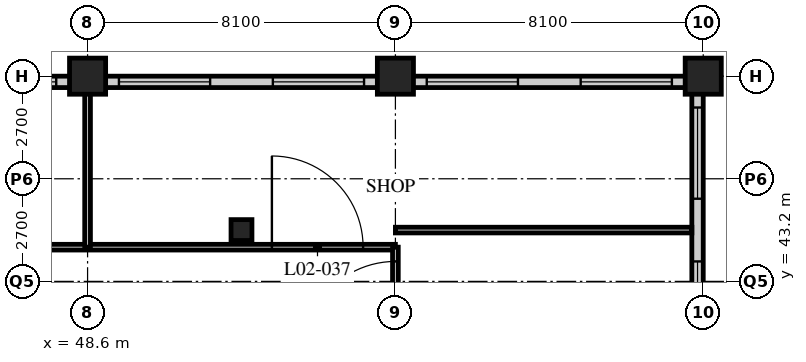
"""IFC4 building model, lengths in metres.
Left out: names, types, materials, properties, quantities, classifications, styles, units other than length and angle.
Written with IfcOpenShell. Run it as: python <this file> out.ifc"""

import sys

from ifc_helpers import new_model, si_unit, direction, frame, frame_2d, origin, origin_2d, place, context, subcontext, project, spatial, rectangle, hollow_rectangle, extrude, element, fill, save


model = new_model("IFC4")
c1 = context("Model", 3, precision=1e-05, world=origin(), true_north=direction((0.0, 1.0)))
c2 = subcontext(c1, "Body", "Model", "MODEL_VIEW")
j1 = project(units=[si_unit("LENGTHUNIT", "METRE"), si_unit("PLANEANGLEUNIT", "RADIAN")], contexts=[c1])
p1 = place(None, origin())
s1 = spatial("IfcSite", under=j1, at=p1, CompositionType="ELEMENT")
p2 = place(p1, origin())
s2 = spatial("IfcBuilding", under=s1, at=p2, CompositionType="ELEMENT")
p3 = place(p2, frame((0.0, 0.0, 11.4)))
s3 = spatial("IfcBuildingStorey", under=s2, at=p3, CompositionType="ELEMENT", Elevation=11.4)
p4 = place(p3, frame((48.6, 48.6, 0.0), z_axis=(0.0, 0.0, 1.0), x_axis=(1.0, 0.0, 0.0)))
e1 = element("IfcColumn", 1, at=p4, inside=s3, PredefinedType="COLUMN", context=c2, shape_type="SweptSolid", body=[
    extrude(hollow_rectangle(XDim=0.95, YDim=0.95, WallThickness=0.1, at=origin_2d()), origin(), (0.0, 0.0, 1.0), 5.4),
])
p5 = place(p3, frame((52.65, 44.55, 0.0), z_axis=(0.0, 0.0, 1.0), x_axis=(1.0, 0.0, 0.0)))
e2 = element("IfcColumn", 2, at=p5, inside=s3, PredefinedType="COLUMN", context=c2, shape_type="SweptSolid", body=[
    extrude(hollow_rectangle(XDim=0.55, YDim=0.55, WallThickness=0.05, at=origin_2d()), origin(), (0.0, 0.0, 1.0), 5.4),
])
for number, where, z_axis, x_axis in (
    (3, (56.7, 48.6, 0.0), (0.0, 0.0, 1.0), (1.0, 0.0, 0.0)),
    (4, (64.8, 48.6, 0.0), (0.0, 0.0, 1.0), (1.0, 0.0, 0.0)),
):
    element("IfcColumn", number, at=place(p3, frame(where, z_axis=z_axis, x_axis=x_axis)), inside=s3, PredefinedType="COLUMN", context=c2, shape_type="SweptSolid", body=[
        extrude(hollow_rectangle(XDim=0.95, YDim=0.95, WallThickness=0.1, at=origin_2d()), origin(), (0.0, 0.0, 1.0), 5.4),
    ])
p6 = place(p3, frame((64.65, 0.24, 0.0), z_axis=(0.0, 0.0, 1.0), x_axis=(0.0, 1.0, 0.0)))
e5 = element("IfcWall", 5, at=p6, inside=s3, PredefinedType="SOLIDWALL", context=c2, shape_type="SweptSolid", body=[
    extrude(rectangle(XDim=48.36, YDim=0.3, at=frame_2d((24.18, 0.0))), origin(), (0.0, 0.0, 1.0), 5.15),
])
p7 = place(p6, frame((0.585, 0.0, 1.0)))
e6 = element("IfcOpeningElement", 6, at=p7, cuts=e5, PredefinedType="OPENING", context=c2, shape_type="SweptSolid", body=[
    extrude(rectangle(XDim=2.4, YDim=2.75, at=frame_2d((1.2, 1.375))), frame((0.0, 0.16, 0.0), z_axis=(0.0, -1.0, 0.0), x_axis=(1.0, 0.0, 0.0)), (0.0, 0.0, 1.0), 0.32),
])
p8 = place(p6, frame((4.635, 0.0, 1.0)))
e7 = element("IfcOpeningElement", 7, at=p8, cuts=e5, PredefinedType="OPENING", context=c2, shape_type="SweptSolid", body=[
    extrude(rectangle(XDim=2.4, YDim=2.75, at=frame_2d((1.2, 1.375))), frame((0.0, 0.16, 0.0), z_axis=(0.0, -1.0, 0.0), x_axis=(1.0, 0.0, 0.0)), (0.0, 0.0, 1.0), 0.32),
])
p9 = place(p6, frame((8.685, 0.0, 1.0)))
e8 = element("IfcOpeningElement", 8, at=p9, cuts=e5, PredefinedType="OPENING", context=c2, shape_type="SweptSolid", body=[
    extrude(rectangle(XDim=2.4, YDim=2.75, at=frame_2d((1.2, 1.375))), frame((0.0, 0.16, 0.0), z_axis=(0.0, -1.0, 0.0), x_axis=(1.0, 0.0, 0.0)), (0.0, 0.0, 1.0), 0.32),
])
p10 = place(p6, frame((12.735, 0.0, 1.0)))
e9 = element("IfcOpeningElement", 9, at=p10, cuts=e5, PredefinedType="OPENING", context=c2, shape_type="SweptSolid", body=[
    extrude(rectangle(XDim=2.4, YDim=2.75, at=frame_2d((1.2, 1.375))), frame((0.0, 0.16, 0.0), z_axis=(0.0, -1.0, 0.0), x_axis=(1.0, 0.0, 0.0)), (0.0, 0.0, 1.0), 0.32),
])
p11 = place(p6, frame((16.785, 0.0, 1.0)))
e10 = element("IfcOpeningElement", 10, at=p11, cuts=e5, PredefinedType="OPENING", context=c2, shape_type="SweptSolid", body=[
    extrude(rectangle(XDim=2.4, YDim=2.75, at=frame_2d((1.2, 1.375))), frame((0.0, 0.16, 0.0), z_axis=(0.0, -1.0, 0.0), x_axis=(1.0, 0.0, 0.0)), (0.0, 0.0, 1.0), 0.32),
])
p12 = place(p6, frame((20.835, 0.0, 1.0)))
e11 = element("IfcOpeningElement", 11, at=p12, cuts=e5, PredefinedType="OPENING", context=c2, shape_type="SweptSolid", body=[
    extrude(rectangle(XDim=2.4, YDim=2.75, at=frame_2d((1.2, 1.375))), frame((0.0, 0.16, 0.0), z_axis=(0.0, -1.0, 0.0), x_axis=(1.0, 0.0, 0.0)), (0.0, 0.0, 1.0), 0.32),
])
p13 = place(p6, frame((24.885, 0.0, 1.0)))
e12 = element("IfcOpeningElement", 12, at=p13, cuts=e5, PredefinedType="OPENING", context=c2, shape_type="SweptSolid", body=[
    extrude(rectangle(XDim=2.4, YDim=2.75, at=frame_2d((1.2, 1.375))), frame((0.0, 0.16, 0.0), z_axis=(0.0, -1.0, 0.0), x_axis=(1.0, 0.0, 0.0)), (0.0, 0.0, 1.0), 0.32),
])
p14 = place(p6, frame((28.935, 0.0, 1.0)))
e13 = element("IfcOpeningElement", 13, at=p14, cuts=e5, PredefinedType="OPENING", context=c2, shape_type="SweptSolid", body=[
    extrude(rectangle(XDim=2.4, YDim=2.75, at=frame_2d((1.2, 1.375))), frame((0.0, 0.16, 0.0), z_axis=(0.0, -1.0, 0.0), x_axis=(1.0, 0.0, 0.0)), (0.0, 0.0, 1.0), 0.32),
])
p15 = place(p6, frame((32.985, 0.0, 1.0)))
e14 = element("IfcOpeningElement", 14, at=p15, cuts=e5, PredefinedType="OPENING", context=c2, shape_type="SweptSolid", body=[
    extrude(rectangle(XDim=2.4, YDim=2.75, at=frame_2d((1.2, 1.375))), frame((0.0, 0.16, 0.0), z_axis=(0.0, -1.0, 0.0), x_axis=(1.0, 0.0, 0.0)), (0.0, 0.0, 1.0), 0.32),
])
p16 = place(p6, frame((37.035, 0.0, 1.0)))
e15 = element("IfcOpeningElement", 15, at=p16, cuts=e5, PredefinedType="OPENING", context=c2, shape_type="SweptSolid", body=[
    extrude(rectangle(XDim=2.4, YDim=2.75, at=frame_2d((1.2, 1.375))), frame((0.0, 0.16, 0.0), z_axis=(0.0, -1.0, 0.0), x_axis=(1.0, 0.0, 0.0)), (0.0, 0.0, 1.0), 0.32),
])
p17 = place(p6, frame((41.085, 0.0, 1.0)))
e16 = element("IfcOpeningElement", 16, at=p17, cuts=e5, PredefinedType="OPENING", context=c2, shape_type="SweptSolid", body=[
    extrude(rectangle(XDim=2.4, YDim=2.75, at=frame_2d((1.2, 1.375))), frame((0.0, 0.16, 0.0), z_axis=(0.0, -1.0, 0.0), x_axis=(1.0, 0.0, 0.0)), (0.0, 0.0, 1.0), 0.32),
])
p18 = place(p6, frame((45.135, 0.0, 1.0)))
e17 = element("IfcOpeningElement", 17, at=p18, cuts=e5, PredefinedType="OPENING", context=c2, shape_type="SweptSolid", body=[
    extrude(rectangle(XDim=2.4, YDim=2.75, at=frame_2d((1.2, 1.375))), frame((0.0, 0.16, 0.0), z_axis=(0.0, -1.0, 0.0), x_axis=(1.0, 0.0, 0.0)), (0.0, 0.0, 1.0), 0.32),
])
p19 = place(p3, frame((64.5, 48.45, 0.0), z_axis=(0.0, 0.0, 1.0), x_axis=(-1.0, 0.0, 0.0)))
e18 = element("IfcWall", 18, at=p19, inside=s3, PredefinedType="SOLIDWALL", context=c2, shape_type="SweptSolid", body=[
    extrude(rectangle(XDim=72.6, YDim=0.3, at=frame_2d((36.3, 0.0))), origin(), (0.0, 0.0, 1.0), 5.15),
])
p20 = place(p19, frame((0.525, 0.0, 1.0)))
e19 = element("IfcOpeningElement", 19, at=p20, cuts=e18, PredefinedType="OPENING", context=c2, shape_type="SweptSolid", body=[
    extrude(rectangle(XDim=2.4, YDim=2.75, at=frame_2d((1.2, 1.375))), frame((0.0, 0.16, 0.0), z_axis=(0.0, -1.0, 0.0), x_axis=(1.0, 0.0, 0.0)), (0.0, 0.0, 1.0), 0.32),
])
p21 = place(p19, frame((4.575, 0.0, 1.0)))
e20 = element("IfcOpeningElement", 20, at=p21, cuts=e18, PredefinedType="OPENING", context=c2, shape_type="SweptSolid", body=[
    extrude(rectangle(XDim=2.4, YDim=2.75, at=frame_2d((1.2, 1.375))), frame((0.0, 0.16, 0.0), z_axis=(0.0, -1.0, 0.0), x_axis=(1.0, 0.0, 0.0)), (0.0, 0.0, 1.0), 0.32),
])
p22 = place(p19, frame((8.625, 0.0, 1.0)))
e21 = element("IfcOpeningElement", 21, at=p22, cuts=e18, PredefinedType="OPENING", context=c2, shape_type="SweptSolid", body=[
    extrude(rectangle(XDim=2.4, YDim=2.75, at=frame_2d((1.2, 1.375))), frame((0.0, 0.16, 0.0), z_axis=(0.0, -1.0, 0.0), x_axis=(1.0, 0.0, 0.0)), (0.0, 0.0, 1.0), 0.32),
])
p23 = place(p19, frame((12.675, 0.0, 1.0)))
e22 = element("IfcOpeningElement", 22, at=p23, cuts=e18, PredefinedType="OPENING", context=c2, shape_type="SweptSolid", body=[
    extrude(rectangle(XDim=2.4, YDim=2.75, at=frame_2d((1.2, 1.375))), frame((0.0, 0.16, 0.0), z_axis=(0.0, -1.0, 0.0), x_axis=(1.0, 0.0, 0.0)), (0.0, 0.0, 1.0), 0.32),
])
p24 = place(p19, frame((16.725, 0.0, 1.0)))
e23 = element("IfcOpeningElement", 23, at=p24, cuts=e18, PredefinedType="OPENING", context=c2, shape_type="SweptSolid", body=[
    extrude(rectangle(XDim=2.4, YDim=2.75, at=frame_2d((1.2, 1.375))), frame((0.0, 0.16, 0.0), z_axis=(0.0, -1.0, 0.0), x_axis=(1.0, 0.0, 0.0)), (0.0, 0.0, 1.0), 0.32),
])
p25 = place(p19, frame((20.775, 0.0, 1.0)))
e24 = element("IfcOpeningElement", 24, at=p25, cuts=e18, PredefinedType="OPENING", context=c2, shape_type="SweptSolid", body=[
    extrude(rectangle(XDim=2.4, YDim=2.75, at=frame_2d((1.2, 1.375))), frame((0.0, 0.16, 0.0), z_axis=(0.0, -1.0, 0.0), x_axis=(1.0, 0.0, 0.0)), (0.0, 0.0, 1.0), 0.32),
])
p26 = place(p19, frame((24.825, 0.0, 1.0)))
e25 = element("IfcOpeningElement", 25, at=p26, cuts=e18, PredefinedType="OPENING", context=c2, shape_type="SweptSolid", body=[
    extrude(rectangle(XDim=2.4, YDim=2.75, at=frame_2d((1.2, 1.375))), frame((0.0, 0.16, 0.0), z_axis=(0.0, -1.0, 0.0), x_axis=(1.0, 0.0, 0.0)), (0.0, 0.0, 1.0), 0.32),
])
p27 = place(p19, frame((28.875, 0.0, 1.0)))
e26 = element("IfcOpeningElement", 26, at=p27, cuts=e18, PredefinedType="OPENING", context=c2, shape_type="SweptSolid", body=[
    extrude(rectangle(XDim=2.4, YDim=2.75, at=frame_2d((1.2, 1.375))), frame((0.0, 0.16, 0.0), z_axis=(0.0, -1.0, 0.0), x_axis=(1.0, 0.0, 0.0)), (0.0, 0.0, 1.0), 0.32),
])
p28 = place(p19, frame((32.925, 0.0, 1.0)))
e27 = element("IfcOpeningElement", 27, at=p28, cuts=e18, PredefinedType="OPENING", context=c2, shape_type="SweptSolid", body=[
    extrude(rectangle(XDim=2.4, YDim=2.75, at=frame_2d((1.2, 1.375))), frame((0.0, 0.16, 0.0), z_axis=(0.0, -1.0, 0.0), x_axis=(1.0, 0.0, 0.0)), (0.0, 0.0, 1.0), 0.32),
])
p29 = place(p19, frame((36.975, 0.0, 1.0)))
e28 = element("IfcOpeningElement", 28, at=p29, cuts=e18, PredefinedType="OPENING", context=c2, shape_type="SweptSolid", body=[
    extrude(rectangle(XDim=2.4, YDim=2.75, at=frame_2d((1.2, 1.375))), frame((0.0, 0.16, 0.0), z_axis=(0.0, -1.0, 0.0), x_axis=(1.0, 0.0, 0.0)), (0.0, 0.0, 1.0), 0.32),
])
p30 = place(p19, frame((41.025, 0.0, 1.0)))
e29 = element("IfcOpeningElement", 29, at=p30, cuts=e18, PredefinedType="OPENING", context=c2, shape_type="SweptSolid", body=[
    extrude(rectangle(XDim=2.4, YDim=2.75, at=frame_2d((1.2, 1.375))), frame((0.0, 0.16, 0.0), z_axis=(0.0, -1.0, 0.0), x_axis=(1.0, 0.0, 0.0)), (0.0, 0.0, 1.0), 0.32),
])
p31 = place(p19, frame((45.075, 0.0, 1.0)))
e30 = element("IfcOpeningElement", 30, at=p31, cuts=e18, PredefinedType="OPENING", context=c2, shape_type="SweptSolid", body=[
    extrude(rectangle(XDim=2.4, YDim=2.75, at=frame_2d((1.2, 1.375))), frame((0.0, 0.16, 0.0), z_axis=(0.0, -1.0, 0.0), x_axis=(1.0, 0.0, 0.0)), (0.0, 0.0, 1.0), 0.32),
])
p32 = place(p19, frame((49.125, 0.0, 1.0)))
e31 = element("IfcOpeningElement", 31, at=p32, cuts=e18, PredefinedType="OPENING", context=c2, shape_type="SweptSolid", body=[
    extrude(rectangle(XDim=2.4, YDim=2.75, at=frame_2d((1.2, 1.375))), frame((0.0, 0.16, 0.0), z_axis=(0.0, -1.0, 0.0), x_axis=(1.0, 0.0, 0.0)), (0.0, 0.0, 1.0), 0.32),
])
p33 = place(p19, frame((53.175, 0.0, 1.0)))
e32 = element("IfcOpeningElement", 32, at=p33, cuts=e18, PredefinedType="OPENING", context=c2, shape_type="SweptSolid", body=[
    extrude(rectangle(XDim=2.4, YDim=2.75, at=frame_2d((1.2, 1.375))), frame((0.0, 0.16, 0.0), z_axis=(0.0, -1.0, 0.0), x_axis=(1.0, 0.0, 0.0)), (0.0, 0.0, 1.0), 0.32),
])
p34 = place(p19, frame((57.225, 0.0, 1.0)))
e33 = element("IfcOpeningElement", 33, at=p34, cuts=e18, PredefinedType="OPENING", context=c2, shape_type="SweptSolid", body=[
    extrude(rectangle(XDim=2.4, YDim=2.75, at=frame_2d((1.2, 1.375))), frame((0.0, 0.16, 0.0), z_axis=(0.0, -1.0, 0.0), x_axis=(1.0, 0.0, 0.0)), (0.0, 0.0, 1.0), 0.32),
])
p35 = place(p19, frame((61.275, 0.0, 1.0)))
e34 = element("IfcOpeningElement", 34, at=p35, cuts=e18, PredefinedType="OPENING", context=c2, shape_type="SweptSolid", body=[
    extrude(rectangle(XDim=2.4, YDim=2.75, at=frame_2d((1.2, 1.375))), frame((0.0, 0.16, 0.0), z_axis=(0.0, -1.0, 0.0), x_axis=(1.0, 0.0, 0.0)), (0.0, 0.0, 1.0), 0.32),
])
p36 = place(p19, frame((65.325, 0.0, 1.0)))
e35 = element("IfcOpeningElement", 35, at=p36, cuts=e18, PredefinedType="OPENING", context=c2, shape_type="SweptSolid", body=[
    extrude(rectangle(XDim=2.4, YDim=2.75, at=frame_2d((1.2, 1.375))), frame((0.0, 0.16, 0.0), z_axis=(0.0, -1.0, 0.0), x_axis=(1.0, 0.0, 0.0)), (0.0, 0.0, 1.0), 0.32),
])
p37 = place(p19, frame((69.375, 0.0, 1.0)))
e36 = element("IfcOpeningElement", 36, at=p37, cuts=e18, PredefinedType="OPENING", context=c2, shape_type="SweptSolid", body=[
    extrude(rectangle(XDim=2.4, YDim=2.75, at=frame_2d((1.2, 1.375))), frame((0.0, 0.16, 0.0), z_axis=(0.0, -1.0, 0.0), x_axis=(1.0, 0.0, 0.0)), (0.0, 0.0, 1.0), 0.32),
])
p38 = place(p3, frame((0.0, 44.1, 0.0), z_axis=(0.0, 0.0, 1.0), x_axis=(1.0, 0.0, 0.0)))
e37 = element("IfcWall", 37, at=p38, inside=s3, PredefinedType="PARTITIONING", context=c2, shape_type="SweptSolid", body=[
    extrude(rectangle(XDim=56.7, YDim=0.15, at=frame_2d((28.35, 0.0))), origin(), (0.0, 0.0, 1.0), 5.15),
])
p39 = place(p38, frame((10.95, 0.0, 0.0)))
e38 = element("IfcOpeningElement", 38, at=p39, cuts=e37, PredefinedType="OPENING", context=c2, shape_type="SweptSolid", body=[
    extrude(rectangle(XDim=2.4, YDim=2.7, at=frame_2d((1.2, 1.35))), frame((0.0, 0.085, 0.0), z_axis=(0.0, -1.0, 0.0), x_axis=(1.0, 0.0, 0.0)), (0.0, 0.0, 1.0), 0.17),
])
p40 = place(p38, frame((19.05, 0.0, 0.0)))
e39 = element("IfcOpeningElement", 39, at=p40, cuts=e37, PredefinedType="OPENING", context=c2, shape_type="SweptSolid", body=[
    extrude(rectangle(XDim=2.4, YDim=2.7, at=frame_2d((1.2, 1.35))), frame((0.0, 0.085, 0.0), z_axis=(0.0, -1.0, 0.0), x_axis=(1.0, 0.0, 0.0)), (0.0, 0.0, 1.0), 0.17),
])
p41 = place(p38, frame((27.15, 0.0, 0.0)))
e40 = element("IfcOpeningElement", 40, at=p41, cuts=e37, PredefinedType="OPENING", context=c2, shape_type="SweptSolid", body=[
    extrude(rectangle(XDim=2.4, YDim=2.7, at=frame_2d((1.2, 1.35))), frame((0.0, 0.085, 0.0), z_axis=(0.0, -1.0, 0.0), x_axis=(1.0, 0.0, 0.0)), (0.0, 0.0, 1.0), 0.17),
])
p42 = place(p38, frame((35.25, 0.0, 0.0)))
e41 = element("IfcOpeningElement", 41, at=p42, cuts=e37, PredefinedType="OPENING", context=c2, shape_type="SweptSolid", body=[
    extrude(rectangle(XDim=2.4, YDim=2.7, at=frame_2d((1.2, 1.35))), frame((0.0, 0.085, 0.0), z_axis=(0.0, -1.0, 0.0), x_axis=(1.0, 0.0, 0.0)), (0.0, 0.0, 1.0), 0.17),
])
p43 = place(p38, frame((43.35, 0.0, 0.0)))
e42 = element("IfcOpeningElement", 42, at=p43, cuts=e37, PredefinedType="OPENING", context=c2, shape_type="SweptSolid", body=[
    extrude(rectangle(XDim=2.4, YDim=2.7, at=frame_2d((1.2, 1.35))), frame((0.0, 0.085, 0.0), z_axis=(0.0, -1.0, 0.0), x_axis=(1.0, 0.0, 0.0)), (0.0, 0.0, 1.0), 0.17),
])
p44 = place(p38, frame((53.45, 0.0, 0.0)))
e43 = element("IfcOpeningElement", 43, at=p44, cuts=e37, PredefinedType="OPENING", context=c2, shape_type="SweptSolid", body=[
    extrude(rectangle(XDim=2.4, YDim=2.7, at=frame_2d((1.2, 1.35))), frame((0.0, 0.085, 0.0), z_axis=(0.0, -1.0, 0.0), x_axis=(1.0, 0.0, 0.0)), (0.0, 0.0, 1.0), 0.17),
])
p45 = place(p38, frame((4.85, 0.0, 0.0)))
e44 = element("IfcOpeningElement", 44, at=p45, cuts=e37, PredefinedType="OPENING", context=c2, shape_type="SweptSolid", body=[
    extrude(rectangle(XDim=2.4, YDim=2.7, at=frame_2d((1.2, 1.35))), frame((0.0, 0.085, 0.0), z_axis=(0.0, -1.0, 0.0), x_axis=(1.0, 0.0, 0.0)), (0.0, 0.0, 1.0), 0.17),
])
p46 = place(p3, frame((56.7, 8.1, 0.0), z_axis=(0.0, 0.0, 1.0), x_axis=(0.0, 1.0, 0.0)))
e45 = element("IfcWall", 45, at=p46, inside=s3, PredefinedType="PARTITIONING", context=c2, shape_type="SweptSolid", body=[
    extrude(rectangle(XDim=36.0, YDim=0.15, at=frame_2d((18.0, 0.0))), origin(), (0.0, 0.0, 1.0), 4.538),
])
p47 = place(p46, frame((2.85, 0.0, 0.0)))
e46 = element("IfcOpeningElement", 46, at=p47, cuts=e45, PredefinedType="OPENING", context=c2, shape_type="SweptSolid", body=[
    extrude(rectangle(XDim=2.4, YDim=2.7, at=frame_2d((1.2, 1.35))), frame((0.0, 0.085, 0.0), z_axis=(0.0, -1.0, 0.0), x_axis=(1.0, 0.0, 0.0)), (0.0, 0.0, 1.0), 0.17),
])
p48 = place(p46, frame((10.95, 0.0, 0.0)))
e47 = element("IfcOpeningElement", 47, at=p48, cuts=e45, PredefinedType="OPENING", context=c2, shape_type="SweptSolid", body=[
    extrude(rectangle(XDim=2.4, YDim=2.7, at=frame_2d((1.2, 1.35))), frame((0.0, 0.085, 0.0), z_axis=(0.0, -1.0, 0.0), x_axis=(1.0, 0.0, 0.0)), (0.0, 0.0, 1.0), 0.17),
])
p49 = place(p46, frame((19.05, 0.0, 0.0)))
e48 = element("IfcOpeningElement", 48, at=p49, cuts=e45, PredefinedType="OPENING", context=c2, shape_type="SweptSolid", body=[
    extrude(rectangle(XDim=2.4, YDim=2.7, at=frame_2d((1.2, 1.35))), frame((0.0, 0.085, 0.0), z_axis=(0.0, -1.0, 0.0), x_axis=(1.0, 0.0, 0.0)), (0.0, 0.0, 1.0), 0.17),
])
p50 = place(p46, frame((27.15, 0.0, 0.0)))
e49 = element("IfcOpeningElement", 49, at=p50, cuts=e45, PredefinedType="OPENING", context=c2, shape_type="SweptSolid", body=[
    extrude(rectangle(XDim=2.4, YDim=2.7, at=frame_2d((1.2, 1.35))), frame((0.0, 0.085, 0.0), z_axis=(0.0, -1.0, 0.0), x_axis=(1.0, 0.0, 0.0)), (0.0, 0.0, 1.0), 0.17),
])
p51 = place(p46, frame((33.225, 0.0, 0.0)))
e50 = element("IfcOpeningElement", 50, at=p51, cuts=e45, PredefinedType="OPENING", context=c2, shape_type="SweptSolid", body=[
    extrude(rectangle(XDim=2.4, YDim=2.7, at=frame_2d((1.2, 1.35))), frame((0.0, 0.085, 0.0), z_axis=(0.0, -1.0, 0.0), x_axis=(1.0, 0.0, 0.0)), (0.0, 0.0, 1.0), 0.17),
])
p52 = place(p3, frame((56.7, 44.55, 0.0), z_axis=(0.0, 0.0, 1.0), x_axis=(1.0, 0.0, 0.0)))
e51 = element("IfcWall", 51, at=p52, inside=s3, PredefinedType="PARTITIONING", context=c2, shape_type="SweptSolid", body=[
    extrude(rectangle(XDim=7.8, YDim=0.15, at=frame_2d((3.9, 0.0))), origin(), (0.0, 0.0, 1.0), 5.15),
])
p53 = place(p3, frame((48.6, 44.1, 0.0), z_axis=(0.0, 0.0, 1.0), x_axis=(0.0, 1.0, 0.0)))
e52 = element("IfcWall", 52, at=p53, inside=s3, PredefinedType="PARTITIONING", context=c2, shape_type="SweptSolid", body=[
    extrude(rectangle(XDim=4.2, YDim=0.15, at=frame_2d((2.1, 0.0))), origin(), (0.0, 0.0, 1.0), 4.538),
])
p54 = place(p17, origin())
e53 = element("IfcWindow", 53, at=p54, inside=s3, PartitioningType="SINGLE_PANEL", PredefinedType="WINDOW", context=c2, shape_type="SweptSolid", body=[
    extrude(rectangle(XDim=2.4, YDim=2.75, at=frame_2d((1.2, 1.375))), frame((0.0, 0.03, 0.0), z_axis=(0.0, -1.0, 0.0), x_axis=(1.0, 0.0, 0.0)), (0.0, 0.0, 1.0), 0.06),
])
fill(e16, e53)
p55 = place(p18, origin())
e54 = element("IfcWindow", 54, at=p55, inside=s3, PartitioningType="SINGLE_PANEL", PredefinedType="WINDOW", context=c2, shape_type="SweptSolid", body=[
    extrude(rectangle(XDim=2.4, YDim=2.75, at=frame_2d((1.2, 1.375))), frame((0.0, 0.03, 0.0), z_axis=(0.0, -1.0, 0.0), x_axis=(1.0, 0.0, 0.0)), (0.0, 0.0, 1.0), 0.06),
])
fill(e17, e54)
p56 = place(p20, origin())
e55 = element("IfcWindow", 55, at=p56, inside=s3, PartitioningType="SINGLE_PANEL", PredefinedType="WINDOW", context=c2, shape_type="SweptSolid", body=[
    extrude(rectangle(XDim=2.4, YDim=2.75, at=frame_2d((1.2, 1.375))), frame((0.0, 0.03, 0.0), z_axis=(0.0, -1.0, 0.0), x_axis=(1.0, 0.0, 0.0)), (0.0, 0.0, 1.0), 0.06),
])
fill(e19, e55)
p57 = place(p21, origin())
e56 = element("IfcWindow", 56, at=p57, inside=s3, PartitioningType="SINGLE_PANEL", PredefinedType="WINDOW", context=c2, shape_type="SweptSolid", body=[
    extrude(rectangle(XDim=2.4, YDim=2.75, at=frame_2d((1.2, 1.375))), frame((0.0, 0.03, 0.0), z_axis=(0.0, -1.0, 0.0), x_axis=(1.0, 0.0, 0.0)), (0.0, 0.0, 1.0), 0.06),
])
fill(e20, e56)
p58 = place(p22, origin())
e57 = element("IfcWindow", 57, at=p58, inside=s3, PartitioningType="SINGLE_PANEL", PredefinedType="WINDOW", context=c2, shape_type="SweptSolid", body=[
    extrude(rectangle(XDim=2.4, YDim=2.75, at=frame_2d((1.2, 1.375))), frame((0.0, 0.03, 0.0), z_axis=(0.0, -1.0, 0.0), x_axis=(1.0, 0.0, 0.0)), (0.0, 0.0, 1.0), 0.06),
])
fill(e21, e57)
p59 = place(p23, origin())
e58 = element("IfcWindow", 58, at=p59, inside=s3, PartitioningType="SINGLE_PANEL", PredefinedType="WINDOW", context=c2, shape_type="SweptSolid", body=[
    extrude(rectangle(XDim=2.4, YDim=2.75, at=frame_2d((1.2, 1.375))), frame((0.0, 0.03, 0.0), z_axis=(0.0, -1.0, 0.0), x_axis=(1.0, 0.0, 0.0)), (0.0, 0.0, 1.0), 0.06),
])
fill(e22, e58)
p60 = place(p24, origin())
e59 = element("IfcWindow", 59, at=p60, inside=s3, PartitioningType="SINGLE_PANEL", PredefinedType="WINDOW", context=c2, shape_type="SweptSolid", body=[
    extrude(rectangle(XDim=2.4, YDim=2.75, at=frame_2d((1.2, 1.375))), frame((0.0, 0.03, 0.0), z_axis=(0.0, -1.0, 0.0), x_axis=(1.0, 0.0, 0.0)), (0.0, 0.0, 1.0), 0.06),
])
fill(e23, e59)
p61 = place(p51, origin())
e60 = element("IfcDoor", 60, at=p61, inside=s3, OperationType="DOUBLE_DOOR_SINGLE_SWING", PredefinedType="DOOR", context=c2, shape_type="SweptSolid", body=[
    extrude(rectangle(XDim=2.4, YDim=2.7, at=frame_2d((1.2, 1.35))), frame((0.0, 0.025, 0.0), z_axis=(0.0, -1.0, 0.0), x_axis=(1.0, 0.0, 0.0)), (0.0, 0.0, 1.0), 0.05),
])
fill(e50, e60)
p62 = place(p44, origin())
e61 = element("IfcDoor", 61, at=p62, inside=s3, OperationType="DOUBLE_DOOR_SINGLE_SWING", PredefinedType="DOOR", context=c2, shape_type="SweptSolid", body=[
    extrude(rectangle(XDim=2.4, YDim=2.7, at=frame_2d((1.2, 1.35))), frame((0.0, 0.025, 0.0), z_axis=(0.0, -1.0, 0.0), x_axis=(1.0, 0.0, 0.0)), (0.0, 0.0, 1.0), 0.05),
])
fill(e43, e61)
save(model, sys.argv[1])
